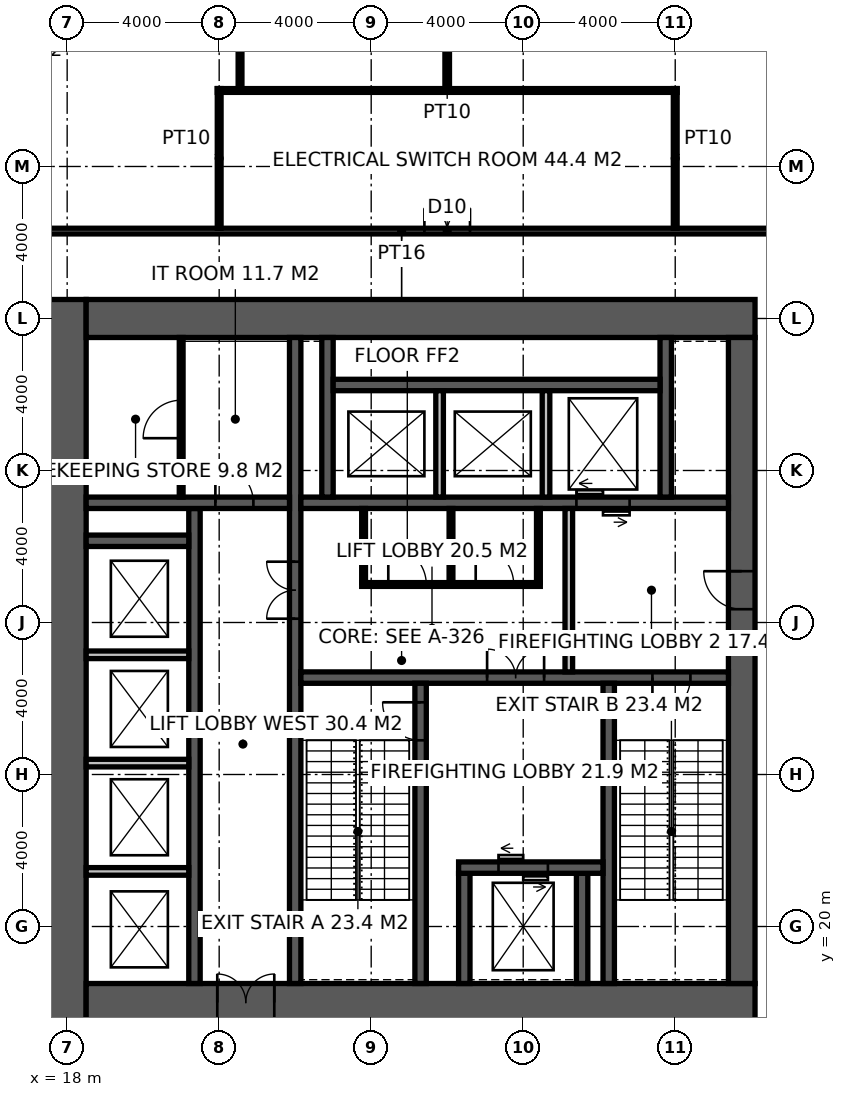
"""IFC4 building model, lengths in metres.
Left out: names, types, materials, properties, quantities, classifications, styles, units other than length and angle.
Written with IfcOpenShell. Run it as: python <this file> out.ifc"""

import sys

from ifc_helpers import new_model, si_unit, direction, frame, frame_2d, origin, place, context, subcontext, project, spatial, rectangle, extrude, element, fill, save


model = new_model("IFC4")
c1 = context("Model", 3, precision=1e-05, world=origin(), true_north=direction((0.0, 1.0)))
c2 = subcontext(c1, "Body", "Model", "MODEL_VIEW")
j1 = project(units=[si_unit("LENGTHUNIT", "METRE"), si_unit("PLANEANGLEUNIT", "RADIAN")], contexts=[c1])
p1 = place(None, origin())
s1 = spatial("IfcSite", under=j1, at=p1, CompositionType="ELEMENT")
p2 = place(p1, origin())
s2 = spatial("IfcBuilding", under=s1, at=p2, CompositionType="ELEMENT")
p3 = place(p2, frame((0.0, 0.0, 137.4)))
s3 = spatial("IfcBuildingStorey", under=s2, at=p3, CompositionType="ELEMENT", Elevation=137.4)
p4 = place(p3, frame((18.0, 17.5, -0.15), z_axis=(0.0, 0.0, 1.0), x_axis=(0.0, 1.0, 0.0)))
e1 = element("IfcWall", 1, at=p4, inside=s3, PredefinedType="SHEAR", context=c2, shape_type="SweptSolid", body=[
    extrude(rectangle(XDim=19.0, YDim=1.0, at=frame_2d((9.5, 0.0))), origin(), (0.0, 0.0, 1.0), 5.4),
])
p5 = place(p3, frame((18.5, 18.0, -0.15), z_axis=(0.0, 0.0, 1.0), x_axis=(1.0, 0.0, 0.0)))
e2 = element("IfcWall", 2, at=p5, inside=s3, PredefinedType="SHEAR", context=c2, shape_type="SweptSolid", body=[
    extrude(rectangle(XDim=17.6, YDim=1.0, at=frame_2d((8.8, 0.0))), origin(), (0.0, 0.0, 1.0), 5.4),
])
p6 = place(p5, frame((3.45, 0.0, 0.15)))
e3 = element("IfcOpeningElement", 3, at=p6, cuts=e2, PredefinedType="OPENING", context=c2, shape_type="SweptSolid", body=[
    extrude(rectangle(XDim=1.5, YDim=2.4, at=frame_2d((0.75, 1.2))), frame((0.0, 0.51, 0.0), z_axis=(0.0, -1.0, 0.0), x_axis=(1.0, 0.0, 0.0)), (0.0, 0.0, 1.0), 1.02),
])
p7 = place(p3, frame((18.5, 36.0, -0.15), z_axis=(0.0, 0.0, 1.0), x_axis=(1.0, 0.0, 0.0)))
e4 = element("IfcWall", 4, at=p7, inside=s3, PredefinedType="SHEAR", context=c2, shape_type="SweptSolid", body=[
    extrude(rectangle(XDim=17.6, YDim=1.0, at=frame_2d((8.8, 0.0))), origin(), (0.0, 0.0, 1.0), 5.4),
])
p8 = place(p3, frame((35.75, 18.5, -0.15), z_axis=(0.0, 0.0, 1.0), x_axis=(0.0, 1.0, 0.0)))
e5 = element("IfcWall", 5, at=p8, inside=s3, PredefinedType="SHEAR", context=c2, shape_type="SweptSolid", body=[
    extrude(rectangle(XDim=17.0, YDim=0.7, at=frame_2d((8.5, 0.0))), origin(), (0.0, 0.0, 1.0), 5.4),
])
p9 = place(p8, frame((9.85, 0.0, 0.15)))
e6 = element("IfcOpeningElement", 6, at=p9, cuts=e5, PredefinedType="OPENING", context=c2, shape_type="SweptSolid", body=[
    extrude(rectangle(XDim=1.0, YDim=2.2, at=frame_2d((0.5, 1.1))), frame((0.0, 0.36, 0.0), z_axis=(0.0, -1.0, 0.0), x_axis=(1.0, 0.0, 0.0)), (0.0, 0.0, 1.0), 0.72),
])
p10 = place(p3, frame((24.0, 18.5, -0.15), z_axis=(0.0, 0.0, 1.0), x_axis=(0.0, 1.0, 0.0)))
e7 = element("IfcWall", 7, at=p10, inside=s3, PredefinedType="SHEAR", context=c2, shape_type="SweptSolid", body=[
    extrude(rectangle(XDim=17.0, YDim=0.3, at=frame_2d((8.5, 0.0))), origin(), (0.0, 0.0, 1.0), 5.4),
])
p11 = place(p10, frame((9.6, 0.0, 0.15)))
e8 = element("IfcOpeningElement", 8, at=p11, cuts=e7, PredefinedType="OPENING", context=c2, shape_type="SweptSolid", body=[
    extrude(rectangle(XDim=1.5, YDim=2.4, at=frame_2d((0.75, 1.2))), frame((0.0, 0.16, 0.0), z_axis=(0.0, -1.0, 0.0), x_axis=(1.0, 0.0, 0.0)), (0.0, 0.0, 1.0), 0.32),
])
p12 = place(p3, frame((24.15, 26.55, -0.15), z_axis=(0.0, 0.0, 1.0), x_axis=(1.0, 0.0, 0.0)))
e9 = element("IfcWall", 9, at=p12, inside=s3, PredefinedType="SHEAR", context=c2, shape_type="SweptSolid", body=[
    extrude(rectangle(XDim=11.25, YDim=0.3, at=frame_2d((5.625, 0.0))), origin(), (0.0, 0.0, 1.0), 5.4),
])
p13 = place(p12, frame((9.25, 0.0, 0.15)))
e10 = element("IfcOpeningElement", 10, at=p13, cuts=e9, PredefinedType="OPENING", context=c2, shape_type="SweptSolid", body=[
    extrude(rectangle(XDim=1.0, YDim=2.2, at=frame_2d((0.5, 1.1))), frame((0.0, 0.16, 0.0), z_axis=(0.0, -1.0, 0.0), x_axis=(1.0, 0.0, 0.0)), (0.0, 0.0, 1.0), 0.32),
])
p14 = place(p12, frame((4.9, 0.0, 0.15)))
e11 = element("IfcOpeningElement", 11, at=p14, cuts=e9, PredefinedType="OPENING", context=c2, shape_type="SweptSolid", body=[
    extrude(rectangle(XDim=1.5, YDim=2.4, at=frame_2d((0.75, 1.2))), frame((0.0, 0.16, 0.0), z_axis=(0.0, -1.0, 0.0), x_axis=(1.0, 0.0, 0.0)), (0.0, 0.0, 1.0), 0.32),
])
p15 = place(p3, frame((27.3, 18.5, -0.15), z_axis=(0.0, 0.0, 1.0), x_axis=(0.0, 1.0, 0.0)))
e12 = element("IfcWall", 12, at=p15, inside=s3, PredefinedType="SHEAR", context=c2, shape_type="SweptSolid", body=[
    extrude(rectangle(XDim=7.9, YDim=0.3, at=frame_2d((3.95, 0.0))), origin(), (0.0, 0.0, 1.0), 5.4),
])
p16 = place(p15, frame((6.4, 0.0, 0.15)))
e13 = element("IfcOpeningElement", 13, at=p16, cuts=e12, PredefinedType="OPENING", context=c2, shape_type="SweptSolid", body=[
    extrude(rectangle(XDim=1.0, YDim=2.2, at=frame_2d((0.5, 1.1))), frame((0.0, 0.16, 0.0), z_axis=(0.0, -1.0, 0.0), x_axis=(1.0, 0.0, 0.0)), (0.0, 0.0, 1.0), 0.32),
])
p17 = place(p3, frame((32.25, 18.5, -0.15), z_axis=(0.0, 0.0, 1.0), x_axis=(0.0, 1.0, 0.0)))
e14 = element("IfcWall", 14, at=p17, inside=s3, PredefinedType="SHEAR", context=c2, shape_type="SweptSolid", body=[
    extrude(rectangle(XDim=7.9, YDim=0.3, at=frame_2d((3.95, 0.0))), origin(), (0.0, 0.0, 1.0), 5.4),
])
for number, where, z_axis, x_axis in (
    (15, (28.45, 18.5, -0.15), (0.0, 0.0, 1.0), (0.0, 1.0, 0.0)),
    (16, (31.55, 18.5, -0.15), (0.0, 0.0, 1.0), (0.0, 1.0, 0.0)),
):
    element("IfcWall", number, at=place(p3, frame(where, z_axis=z_axis, x_axis=x_axis)), inside=s3, PredefinedType="SHEAR", context=c2, shape_type="SweptSolid", body=[
        extrude(rectangle(XDim=2.9, YDim=0.3, at=frame_2d((1.45, 0.0))), origin(), (0.0, 0.0, 1.0), 5.4),
    ])
p18 = place(p3, frame((28.3, 21.55, -0.15), z_axis=(0.0, 0.0, 1.0), x_axis=(1.0, 0.0, 0.0)))
e17 = element("IfcWall", 17, at=p18, inside=s3, PredefinedType="SHEAR", context=c2, shape_type="SweptSolid", body=[
    extrude(rectangle(XDim=3.8, YDim=0.3, at=frame_2d((1.9, 0.0))), origin(), (0.0, 0.0, 1.0), 5.4),
])
p19 = place(p18, frame((1.05, 0.0, 0.15)))
e18 = element("IfcOpeningElement", 18, at=p19, cuts=e17, PredefinedType="OPENING", context=c2, shape_type="SweptSolid", body=[
    extrude(rectangle(XDim=1.3, YDim=2.4, at=frame_2d((0.65, 1.2))), frame((0.0, 0.16, 0.0), z_axis=(0.0, -1.0, 0.0), x_axis=(1.0, 0.0, 0.0)), (0.0, 0.0, 1.0), 0.32),
])
p20 = place(p3, frame((24.15, 31.15, -0.15), z_axis=(0.0, 0.0, 1.0), x_axis=(1.0, 0.0, 0.0)))
e19 = element("IfcWall", 19, at=p20, inside=s3, PredefinedType="SHEAR", context=c2, shape_type="SweptSolid", body=[
    extrude(rectangle(XDim=11.25, YDim=0.3, at=frame_2d((5.625, 0.0))), origin(), (0.0, 0.0, 1.0), 5.4),
])
p21 = place(p20, frame((7.25, 0.0, 0.15)))
e20 = element("IfcOpeningElement", 20, at=p21, cuts=e19, PredefinedType="OPENING", context=c2, shape_type="SweptSolid", body=[
    extrude(rectangle(XDim=1.4, YDim=2.4, at=frame_2d((0.7, 1.2))), frame((0.0, 0.16, 0.0), z_axis=(0.0, -1.0, 0.0), x_axis=(1.0, 0.0, 0.0)), (0.0, 0.0, 1.0), 0.32),
])
p22 = place(p3, frame((21.35, 18.5, -0.15), z_axis=(0.0, 0.0, 1.0), x_axis=(0.0, 1.0, 0.0)))
e21 = element("IfcWall", 21, at=p22, inside=s3, PredefinedType="SHEAR", context=c2, shape_type="SweptSolid", body=[
    extrude(rectangle(XDim=12.5, YDim=0.3, at=frame_2d((6.25, 0.0))), origin(), (0.0, 0.0, 1.0), 5.4),
])
p23 = place(p3, frame((18.5, 31.15, -0.15), z_axis=(0.0, 0.0, 1.0), x_axis=(1.0, 0.0, 0.0)))
e22 = element("IfcWall", 22, at=p23, inside=s3, PredefinedType="SHEAR", context=c2, shape_type="SweptSolid", body=[
    extrude(rectangle(XDim=5.35, YDim=0.3, at=frame_2d((2.675, 0.0))), origin(), (0.0, 0.0, 1.0), 5.4),
])
p24 = place(p23, frame((3.4, 0.0, 0.15)))
e23 = element("IfcOpeningElement", 23, at=p24, cuts=e22, PredefinedType="OPENING", context=c2, shape_type="SweptSolid", body=[
    extrude(rectangle(XDim=1.0, YDim=2.2, at=frame_2d((0.5, 1.1))), frame((0.0, 0.16, 0.0), z_axis=(0.0, -1.0, 0.0), x_axis=(1.0, 0.0, 0.0)), (0.0, 0.0, 1.0), 0.32),
])
p25 = place(p3, frame((18.5, 30.15, -0.15), z_axis=(0.0, 0.0, 1.0), x_axis=(1.0, 0.0, 0.0)))
e24 = element("IfcWall", 24, at=p25, inside=s3, PredefinedType="SHEAR", context=c2, shape_type="SweptSolid", body=[
    extrude(rectangle(XDim=2.7, YDim=0.3, at=frame_2d((1.35, 0.0))), origin(), (0.0, 0.0, 1.0), 5.4),
])
for number, where, z_axis, x_axis in (
    (25, (24.85, 31.3, -0.15), (0.0, 0.0, 1.0), (0.0, 1.0, 0.0)),
    (26, (33.75, 31.3, -0.15), (0.0, 0.0, 1.0), (0.0, 1.0, 0.0)),
):
    element("IfcWall", number, at=place(p3, frame(where, z_axis=z_axis, x_axis=x_axis)), inside=s3, PredefinedType="SHEAR", context=c2, shape_type="SweptSolid", body=[
        extrude(rectangle(XDim=4.2, YDim=0.3, at=frame_2d((2.1, 0.0))), origin(), (0.0, 0.0, 1.0), 5.4),
    ])
p26 = place(p3, frame((25.0, 34.25, -0.15), z_axis=(0.0, 0.0, 1.0), x_axis=(1.0, 0.0, 0.0)))
e27 = element("IfcWall", 27, at=p26, inside=s3, PredefinedType="SHEAR", context=c2, shape_type="SweptSolid", body=[
    extrude(rectangle(XDim=8.6, YDim=0.3, at=frame_2d((4.3, 0.0))), origin(), (0.0, 0.0, 1.0), 5.4),
])
for number, where, z_axis, x_axis in (
    (28, (27.8, 31.3, -0.15), (0.0, 0.0, 1.0), (0.0, 1.0, 0.0)),
    (29, (30.6, 31.3, -0.15), (0.0, 0.0, 1.0), (0.0, 1.0, 0.0)),
):
    element("IfcWall", number, at=place(p3, frame(where, z_axis=z_axis, x_axis=x_axis)), inside=s3, PredefinedType="SOLIDWALL", context=c2, shape_type="SweptSolid", body=[
        extrude(rectangle(XDim=2.8, YDim=0.2, at=frame_2d((1.4, 0.0))), origin(), (0.0, 0.0, 1.0), 5.4),
    ])
for number, where, z_axis, x_axis in (
    (30, (18.5, 21.45, 0.0), (0.0, 0.0, 1.0), (1.0, 0.0, 0.0)),
    (31, (18.5, 24.3, 0.0), (0.0, 0.0, 1.0), (1.0, 0.0, 0.0)),
    (32, (18.5, 27.15, 0.0), (0.0, 0.0, 1.0), (1.0, 0.0, 0.0)),
):
    element("IfcWall", number, at=place(p3, frame(where, z_axis=z_axis, x_axis=x_axis)), inside=s3, PredefinedType="SOLIDWALL", context=c2, shape_type="SweptSolid", body=[
        extrude(rectangle(XDim=2.7, YDim=0.2, at=frame_2d((1.35, 0.0))), origin(), (0.0, 0.0, 1.0), 5.25),
    ])
p27 = place(p3, frame((31.2, 26.7, 0.0), z_axis=(0.0, 0.0, 1.0), x_axis=(0.0, 1.0, 0.0)))
e33 = element("IfcWall", 33, at=p27, inside=s3, PredefinedType="SOLIDWALL", context=c2, shape_type="SweptSolid", body=[
    extrude(rectangle(XDim=4.3, YDim=0.2, at=frame_2d((2.15, 0.0))), origin(), (0.0, 0.0, 1.0), 5.25),
])
p28 = place(p3, frame((21.0, 31.3, 0.0), z_axis=(0.0, 0.0, 1.0), x_axis=(0.0, 1.0, 0.0)))
e34 = element("IfcWall", 34, at=p28, inside=s3, PredefinedType="PARTITIONING", context=c2, shape_type="SweptSolid", body=[
    extrude(rectangle(XDim=4.2, YDim=0.1, at=frame_2d((2.1, 0.0))), origin(), (0.0, 0.0, 1.0), 5.25),
])
p29 = place(p28, frame((1.55, 0.0, 0.0)))
e35 = element("IfcOpeningElement", 35, at=p29, cuts=e34, PredefinedType="OPENING", context=c2, shape_type="SweptSolid", body=[
    extrude(rectangle(XDim=1.0, YDim=2.2, at=frame_2d((0.5, 1.1))), frame((0.0, 0.06, 0.0), z_axis=(0.0, -1.0, 0.0), x_axis=(1.0, 0.0, 0.0)), (0.0, 0.0, 1.0), 0.12),
])
p30 = place(p3, frame((25.75, 29.0, 0.0), z_axis=(0.0, 0.0, 1.0), x_axis=(1.0, 0.0, 0.0)))
e36 = element("IfcWall", 36, at=p30, inside=s3, PredefinedType="PARTITIONING", context=c2, shape_type="SweptSolid", body=[
    extrude(rectangle(XDim=4.7, YDim=0.1, at=frame_2d((2.35, 0.0))), origin(), (0.0, 0.0, 1.0), 5.25),
])
p31 = place(p30, frame((0.7, 0.0, 0.0)))
e37 = element("IfcOpeningElement", 37, at=p31, cuts=e36, PredefinedType="OPENING", context=c2, shape_type="SweptSolid", body=[
    extrude(rectangle(XDim=1.0, YDim=2.2, at=frame_2d((0.5, 1.1))), frame((0.0, 0.06, 0.0), z_axis=(0.0, -1.0, 0.0), x_axis=(1.0, 0.0, 0.0)), (0.0, 0.0, 1.0), 0.12),
])
p32 = place(p30, frame((3.0, 0.0, 0.0)))
e38 = element("IfcOpeningElement", 38, at=p32, cuts=e36, PredefinedType="OPENING", context=c2, shape_type="SweptSolid", body=[
    extrude(rectangle(XDim=1.0, YDim=2.2, at=frame_2d((0.5, 1.1))), frame((0.0, 0.06, 0.0), z_axis=(0.0, -1.0, 0.0), x_axis=(1.0, 0.0, 0.0)), (0.0, 0.0, 1.0), 0.12),
])
for number, where, z_axis, x_axis in (
    (39, (25.8, 29.05, 0.0), (0.0, 0.0, 1.0), (0.0, 1.0, 0.0)),
    (40, (30.4, 29.05, 0.0), (0.0, 0.0, 1.0), (0.0, 1.0, 0.0)),
    (41, (28.1, 29.05, 0.0), (0.0, 0.0, 1.0), (0.0, 1.0, 0.0)),
):
    element("IfcWall", number, at=place(p3, frame(where, z_axis=z_axis, x_axis=x_axis)), inside=s3, PredefinedType="PARTITIONING", context=c2, shape_type="SweptSolid", body=[
        extrude(rectangle(XDim=1.95, YDim=0.1, at=frame_2d((0.975, 0.0))), origin(), (0.0, 0.0, 1.0), 5.25),
    ])
p33 = place(p3, frame((15.775, 38.3, 0.0), z_axis=(0.0, 0.0, 1.0), x_axis=(1.0, 0.0, 0.0)))
e42 = element("IfcWall", 42, at=p33, inside=s3, PredefinedType="PARTITIONING", context=c2, shape_type="SweptSolid", body=[
    extrude(rectangle(XDim=22.05, YDim=0.15, at=frame_2d((11.025, 0.0))), origin(), (0.0, 0.0, 1.0), 5.25),
])
p34 = place(p33, frame((11.625, 0.0, 0.0)))
e43 = element("IfcOpeningElement", 43, at=p34, cuts=e42, PredefinedType="OPENING", context=c2, shape_type="SweptSolid", body=[
    extrude(rectangle(XDim=1.2, YDim=2.2, at=frame_2d((0.6, 1.1))), frame((0.0, 0.085, 0.0), z_axis=(0.0, -1.0, 0.0), x_axis=(1.0, 0.0, 0.0)), (0.0, 0.0, 1.0), 0.17),
])
p35 = place(p3, frame((22.0, 38.375, 0.0), z_axis=(0.0, 0.0, 1.0), x_axis=(0.0, 1.0, 0.0)))
e44 = element("IfcWall", 44, at=p35, inside=s3, PredefinedType="PARTITIONING", context=c2, shape_type="SweptSolid", body=[
    extrude(rectangle(XDim=3.675, YDim=0.1, at=frame_2d((1.837, 0.0))), origin(), (0.0, 0.0, 1.0), 4.35),
])
p36 = place(p3, frame((34.0, 38.375, 0.0), z_axis=(0.0, 0.0, 1.0), x_axis=(0.0, 1.0, 0.0)))
e45 = element("IfcWall", 45, at=p36, inside=s3, PredefinedType="PARTITIONING", context=c2, shape_type="SweptSolid", body=[
    extrude(rectangle(XDim=3.675, YDim=0.1, at=frame_2d((1.837, 0.0))), origin(), (0.0, 0.0, 1.0), 4.25),
])
p37 = place(p3, frame((21.95, 42.0, 0.0), z_axis=(0.0, 0.0, 1.0), x_axis=(1.0, 0.0, 0.0)))
e46 = element("IfcWall", 46, at=p37, inside=s3, PredefinedType="PARTITIONING", context=c2, shape_type="SweptSolid", body=[
    extrude(rectangle(XDim=12.1, YDim=0.1, at=frame_2d((6.05, 0.0))), origin(), (0.0, 0.0, 1.0), 5.25),
])
p38 = place(p3, frame((28.0, 42.05, 0.0), z_axis=(0.0, 0.0, 1.0), x_axis=(0.0, 1.0, 0.0)))
e47 = element("IfcWall", 47, at=p38, inside=s3, PredefinedType="PARTITIONING", context=c2, shape_type="SweptSolid", body=[
    extrude(rectangle(XDim=9.65, YDim=0.12, at=frame_2d((4.825, 0.0))), origin(), (0.0, 0.0, 1.0), 5.25),
])
p39 = place(p3, frame((22.549, 51.32, 0.0), z_axis=(0.0, 0.0, 1.0), x_axis=(0.0, -1.0, 0.0)))
e48 = element("IfcWall", 48, at=p39, inside=s3, PredefinedType="PARTITIONING", context=c2, shape_type="SweptSolid", body=[
    extrude(rectangle(XDim=9.32, YDim=0.1, at=frame_2d((4.66, 0.0))), origin(), (0.0, 0.0, 1.0), 5.25),
])
p40 = place(p39, frame((3.66, 0.0, 0.0)))
e49 = element("IfcOpeningElement", 49, at=p40, cuts=e48, PredefinedType="OPENING", context=c2, shape_type="SweptSolid", body=[
    extrude(rectangle(XDim=2.0, YDim=2.4, at=frame_2d((1.0, 1.2))), frame((0.0, 0.06, 0.0), z_axis=(0.0, -1.0, 0.0), x_axis=(1.0, 0.0, 0.0)), (0.0, 0.0, 1.0), 0.12),
])
p41 = place(p16, origin())
e50 = element("IfcDoor", 50, at=p41, inside=s3, OperationType="SINGLE_SWING_RIGHT", PredefinedType="DOOR", context=c2, shape_type="SweptSolid", body=[
    extrude(rectangle(XDim=1.0, YDim=2.2, at=frame_2d((0.5, 1.1))), frame((0.0, 0.025, 0.0), z_axis=(0.0, -1.0, 0.0), x_axis=(1.0, 0.0, 0.0)), (0.0, 0.0, 1.0), 0.05),
])
fill(e13, e50)
p42 = place(p13, frame((1.0, 0.0, 0.0), z_axis=(0.0, 0.0, 1.0), x_axis=(-1.0, 0.0, 0.0)))
e51 = element("IfcDoor", 51, at=p42, inside=s3, OperationType="SINGLE_SWING_RIGHT", PredefinedType="DOOR", context=c2, shape_type="SweptSolid", body=[
    extrude(rectangle(XDim=1.0, YDim=2.2, at=frame_2d((0.5, 1.1))), frame((0.0, 0.025, 0.0), z_axis=(0.0, -1.0, 0.0), x_axis=(1.0, 0.0, 0.0)), (0.0, 0.0, 1.0), 0.05),
])
fill(e10, e51)
p43 = place(p9, origin())
e52 = element("IfcDoor", 52, at=p43, inside=s3, OperationType="SINGLE_SWING_RIGHT", PredefinedType="DOOR", context=c2, shape_type="SweptSolid", body=[
    extrude(rectangle(XDim=1.0, YDim=2.2, at=frame_2d((0.5, 1.1))), frame((0.0, 0.025, 0.0), z_axis=(0.0, -1.0, 0.0), x_axis=(1.0, 0.0, 0.0)), (0.0, 0.0, 1.0), 0.05),
])
fill(e6, e52)
p44 = place(p14, origin())
e53 = element("IfcDoor", 53, at=p44, inside=s3, OperationType="DOUBLE_DOOR_DOUBLE_SWING", PredefinedType="DOOR", context=c2, shape_type="SweptSolid", body=[
    extrude(rectangle(XDim=1.5, YDim=2.4, at=frame_2d((0.75, 1.2))), frame((0.0, 0.025, 0.0), z_axis=(0.0, -1.0, 0.0), x_axis=(1.0, 0.0, 0.0)), (0.0, 0.0, 1.0), 0.05),
])
fill(e11, e53)
p45 = place(p11, origin())
e54 = element("IfcDoor", 54, at=p45, inside=s3, OperationType="DOUBLE_DOOR_DOUBLE_SWING", PredefinedType="DOOR", context=c2, shape_type="SweptSolid", body=[
    extrude(rectangle(XDim=1.5, YDim=2.4, at=frame_2d((0.75, 1.2))), frame((0.0, 0.025, 0.0), z_axis=(0.0, -1.0, 0.0), x_axis=(1.0, 0.0, 0.0)), (0.0, 0.0, 1.0), 0.05),
])
fill(e8, e54)
p46 = place(p24, origin())
e55 = element("IfcDoor", 55, at=p46, inside=s3, OperationType="SINGLE_SWING_LEFT", PredefinedType="DOOR", context=c2, shape_type="SweptSolid", body=[
    extrude(rectangle(XDim=1.0, YDim=2.2, at=frame_2d((0.5, 1.1))), frame((0.0, 0.025, 0.0), z_axis=(0.0, -1.0, 0.0), x_axis=(1.0, 0.0, 0.0)), (0.0, 0.0, 1.0), 0.05),
])
fill(e23, e55)
p47 = place(p29, origin())
e56 = element("IfcDoor", 56, at=p47, inside=s3, OperationType="SINGLE_SWING_LEFT", PredefinedType="DOOR", context=c2, shape_type="SweptSolid", body=[
    extrude(rectangle(XDim=1.0, YDim=2.2, at=frame_2d((0.5, 1.1))), frame((0.0, 0.025, 0.0), z_axis=(0.0, -1.0, 0.0), x_axis=(1.0, 0.0, 0.0)), (0.0, 0.0, 1.0), 0.05),
])
fill(e35, e56)
p48 = place(p31, origin())
e57 = element("IfcDoor", 57, at=p48, inside=s3, OperationType="SINGLE_SWING_LEFT", PredefinedType="DOOR", context=c2, shape_type="SweptSolid", body=[
    extrude(rectangle(XDim=1.0, YDim=2.2, at=frame_2d((0.5, 1.1))), frame((0.0, 0.025, 0.0), z_axis=(0.0, -1.0, 0.0), x_axis=(1.0, 0.0, 0.0)), (0.0, 0.0, 1.0), 0.05),
])
fill(e37, e57)
p49 = place(p32, origin())
e58 = element("IfcDoor", 58, at=p49, inside=s3, OperationType="SINGLE_SWING_LEFT", PredefinedType="DOOR", context=c2, shape_type="SweptSolid", body=[
    extrude(rectangle(XDim=1.0, YDim=2.2, at=frame_2d((0.5, 1.1))), frame((0.0, 0.025, 0.0), z_axis=(0.0, -1.0, 0.0), x_axis=(1.0, 0.0, 0.0)), (0.0, 0.0, 1.0), 0.05),
])
fill(e38, e58)
p50 = place(p6, origin())
e59 = element("IfcDoor", 59, at=p50, inside=s3, OperationType="DOUBLE_DOOR_DOUBLE_SWING", PredefinedType="DOOR", context=c2, shape_type="SweptSolid", body=[
    extrude(rectangle(XDim=1.5, YDim=2.4, at=frame_2d((0.75, 1.2))), frame((0.0, 0.025, 0.0), z_axis=(0.0, -1.0, 0.0), x_axis=(1.0, 0.0, 0.0)), (0.0, 0.0, 1.0), 0.05),
])
fill(e3, e59)
p51 = place(p34, origin())
e60 = element("IfcDoor", 60, at=p51, inside=s3, OperationType="DOUBLE_DOOR_DOUBLE_SWING", PredefinedType="DOOR", context=c2, shape_type="SweptSolid", body=[
    extrude(rectangle(XDim=1.2, YDim=2.2, at=frame_2d((0.6, 1.1))), frame((0.0, 0.025, 0.0), z_axis=(0.0, -1.0, 0.0), x_axis=(1.0, 0.0, 0.0)), (0.0, 0.0, 1.0), 0.05),
])
fill(e43, e60)
p52 = place(p19, origin())
e61 = element("IfcDoor", 61, at=p52, inside=s3, OperationType="DOUBLE_DOOR_SLIDING", PredefinedType="DOOR", context=c2, shape_type="SweptSolid", body=[
    extrude(rectangle(XDim=1.3, YDim=2.4, at=frame_2d((0.65, 1.2))), frame((0.0, 0.025, 0.0), z_axis=(0.0, -1.0, 0.0), x_axis=(1.0, 0.0, 0.0)), (0.0, 0.0, 1.0), 0.05),
])
fill(e18, e61)
p53 = place(p21, origin())
e62 = element("IfcDoor", 62, at=p53, inside=s3, OperationType="DOUBLE_DOOR_SLIDING", PredefinedType="DOOR", context=c2, shape_type="SweptSolid", body=[
    extrude(rectangle(XDim=1.4, YDim=2.4, at=frame_2d((0.7, 1.2))), frame((0.0, 0.025, 0.0), z_axis=(0.0, -1.0, 0.0), x_axis=(1.0, 0.0, 0.0)), (0.0, 0.0, 1.0), 0.05),
])
fill(e20, e62)
save(model, sys.argv[1])
